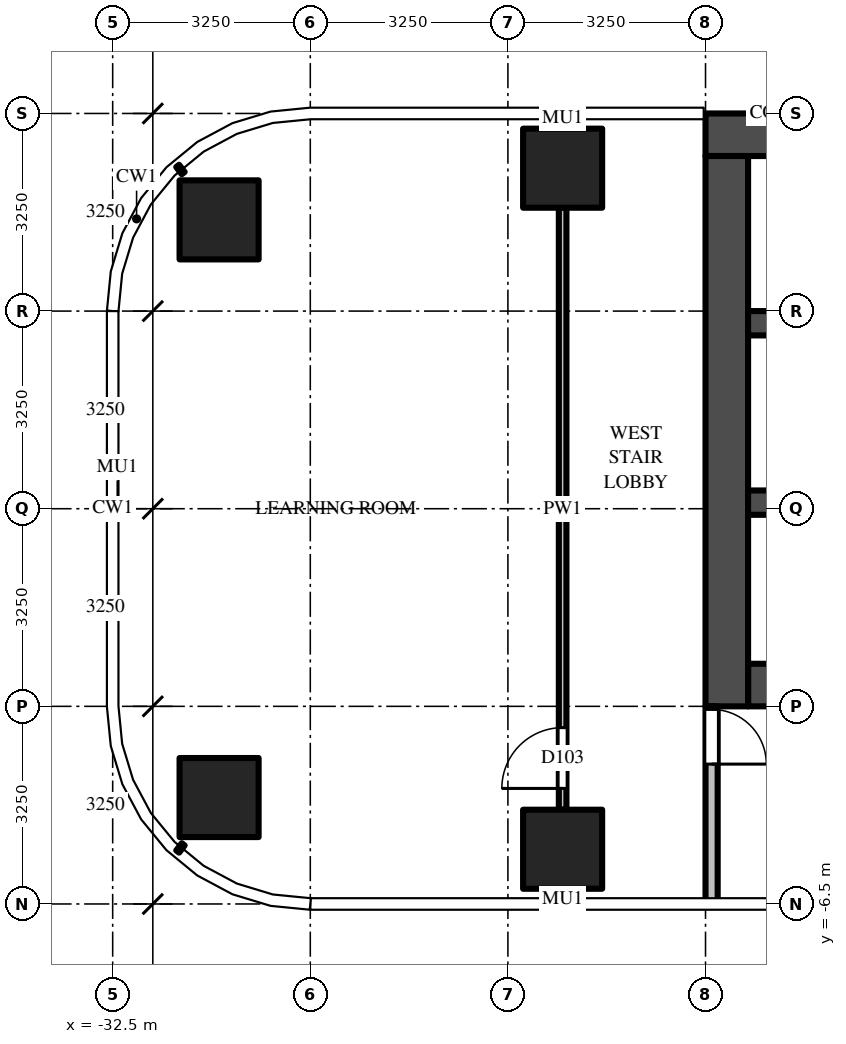
"""IFC4 building model, lengths in metres.
Left out: names, types, materials, properties, quantities, classifications, styles, units other than length and angle.
Written with IfcOpenShell. Run it as: python <this file> out.ifc"""

import sys

from ifc_helpers import new_model, si_unit, direction, frame, frame_2d, origin, origin_2d, place, context, subcontext, project, spatial, polyline, rectangle, outline, extrude, source, transform, mapped, element, fill, save


model = new_model("IFC4")
c1 = context("Model", 3, precision=1e-05, world=origin(), true_north=direction((0.0, 1.0)))
c2 = subcontext(c1, "Body", "Model", "MODEL_VIEW")
j1 = project(units=[si_unit("LENGTHUNIT", "METRE"), si_unit("PLANEANGLEUNIT", "RADIAN")], contexts=[c1])
p1 = place(None, origin())
s1 = spatial("IfcSite", under=j1, at=p1, CompositionType="ELEMENT")
p2 = place(p1, origin())
s2 = spatial("IfcBuilding", under=s1, at=p2, CompositionType="ELEMENT")
p3 = place(p2, frame((0.0, 0.0, 102.0)))
s3 = spatial("IfcBuildingStorey", under=s2, at=p3, CompositionType="ELEMENT", Elevation=102.0)
m1 = source(origin(), c2, "Body", "SweptSolid", [
    extrude(rectangle(XDim=1.3, YDim=1.3, at=origin_2d()), origin(), (0.0, 0.0, 1.0), 4.5),
])
for number, where, z_axis, x_axis in (
    (1, (-25.1, -5.6, 0.0), (0.0, 0.0, 1.0), (1.0, 0.0, 0.0)),
    (2, (-30.75, -4.75, 0.0), (0.0, 0.0, 1.0), (1.0, 0.0, 0.0)),
    (3, (-25.1, 5.6, 0.0), (0.0, 0.0, 1.0), (1.0, 0.0, 0.0)),
    (4, (-30.75, 4.75, 0.0), (0.0, 0.0, 1.0), (1.0, 0.0, 0.0)),
):
    element("IfcColumn", number, at=place(p3, frame(where, z_axis=z_axis, x_axis=x_axis)), inside=s3, PredefinedType="COLUMN", context=c2, shape_type="MappedRepresentation", body=[
        mapped(m1, transform((0.0, 0.0, 0.0))),
    ])
m2 = source(origin(), c2, "Body", "SweptSolid", [
    extrude(rectangle(XDim=16.5, YDim=0.7, at=frame_2d((8.25, 0.0))), origin(), (0.0, 0.0, 1.0), 4.25),
])
p4 = place(p3, frame((-6.25, 6.15, 0.0), z_axis=(0.0, 0.0, 1.0), x_axis=(-1.0, 0.0, 0.0)))
e5 = element("IfcWall", 5, at=p4, inside=s3, PredefinedType="SHEAR", context=c2, shape_type="MappedRepresentation", body=[
    mapped(m2, transform((0.0, 0.0, 0.0))),
])
m3 = source(origin(), c2, "Body", "SweptSolid", [
    extrude(rectangle(XDim=14.85, YDim=0.7, at=frame_2d((7.425, 0.0))), origin(), (0.0, 0.0, 1.0), 4.25),
])
p5 = place(p3, frame((-7.2, -2.9, 0.0), z_axis=(0.0, 0.0, 1.0), x_axis=(-1.0, 0.0, 0.0)))
e6 = element("IfcWall", 6, at=p5, inside=s3, PredefinedType="SHEAR", context=c2, shape_type="MappedRepresentation", body=[
    mapped(m3, transform((0.0, 0.0, 0.0))),
])
m4 = source(origin(), c2, "Body", "SweptSolid", [
    extrude(rectangle(XDim=1.3, YDim=2.1, at=frame_2d((0.65, 1.05))), frame((0.0, 0.36, 0.0), z_axis=(0.0, -1.0, 0.0), x_axis=(1.0, 0.0, 0.0)), (0.0, 0.0, 1.0), 0.72),
])
p6 = place(p5, frame((12.2, 0.0, 0.0)))
e7 = element("IfcOpeningElement", 7, at=p6, cuts=e6, PredefinedType="OPENING", context=c2, shape_type="MappedRepresentation", body=[
    mapped(m4, transform((0.0, 0.0, 0.0))),
])
m5 = source(origin(), c2, "Body", "SweptSolid", [
    extrude(rectangle(XDim=1.2, YDim=2.1, at=frame_2d((0.6, 1.05))), frame((0.0, 0.36, 0.0), z_axis=(0.0, -1.0, 0.0), x_axis=(1.0, 0.0, 0.0)), (0.0, 0.0, 1.0), 0.72),
])
p7 = place(p5, frame((9.85, 0.0, 0.0)))
e8 = element("IfcOpeningElement", 8, at=p7, cuts=e6, PredefinedType="OPENING", context=c2, shape_type="MappedRepresentation", body=[
    mapped(m5, transform((0.0, 0.0, 0.0))),
])
m6 = source(origin(), c2, "Body", "SweptSolid", [
    extrude(rectangle(XDim=1.0, YDim=2.1, at=frame_2d((0.5, 1.05))), frame((0.0, 0.36, 0.0), z_axis=(0.0, -1.0, 0.0), x_axis=(1.0, 0.0, 0.0)), (0.0, 0.0, 1.0), 0.72),
])
p8 = place(p5, frame((7.9, 0.0, 0.0)))
e9 = element("IfcOpeningElement", 9, at=p8, cuts=e6, PredefinedType="OPENING", context=c2, shape_type="MappedRepresentation", body=[
    mapped(m6, transform((0.0, 0.0, 0.0))),
])
m7 = source(origin(), c2, "Body", "SweptSolid", [
    extrude(rectangle(XDim=0.9, YDim=2.1, at=frame_2d((0.45, 1.05))), frame((0.0, 0.36, 0.0), z_axis=(0.0, -1.0, 0.0), x_axis=(1.0, 0.0, 0.0)), (0.0, 0.0, 1.0), 0.72),
])
p9 = place(p5, frame((0.65, 0.0, 0.0)))
e10 = element("IfcOpeningElement", 10, at=p9, cuts=e6, PredefinedType="OPENING", context=c2, shape_type="MappedRepresentation", body=[
    mapped(m7, transform((0.0, 0.0, 0.0))),
])
p10 = place(p5, frame((3.25, 0.0, 0.0)))
e11 = element("IfcOpeningElement", 11, at=p10, cuts=e6, PredefinedType="OPENING", context=c2, shape_type="MappedRepresentation", body=[
    mapped(m7, transform((0.0, 0.0, 0.0))),
])
p11 = place(p5, frame((5.8, 0.0, 0.0)))
e12 = element("IfcOpeningElement", 12, at=p11, cuts=e6, PredefinedType="OPENING", context=c2, shape_type="MappedRepresentation", body=[
    mapped(m6, transform((0.0, 0.0, 0.0))),
])
m8 = source(origin(), c2, "Body", "SweptSolid", [
    extrude(rectangle(XDim=9.05, YDim=0.7, at=frame_2d((4.525, 0.0))), origin(), (0.0, 0.0, 1.0), 4.25),
])
p12 = place(p3, frame((-22.4, 5.8, 0.0), z_axis=(0.0, 0.0, 1.0), x_axis=(0.0, -1.0, 0.0)))
e13 = element("IfcWall", 13, at=p12, inside=s3, PredefinedType="SHEAR", context=c2, shape_type="MappedRepresentation", body=[
    mapped(m8, transform((0.0, 0.0, 0.0))),
])
m9 = source(origin(), c2, "Body", "SweptSolid", [
    extrude(rectangle(XDim=14.85, YDim=0.4, at=frame_2d((7.425, 0.0))), origin(), (0.0, 0.0, 1.0), 4.25),
])
p13 = place(p3, frame((-7.2, 0.1, 0.0), z_axis=(0.0, 0.0, 1.0), x_axis=(-1.0, 0.0, 0.0)))
e14 = element("IfcWall", 14, at=p13, inside=s3, PredefinedType="SHEAR", context=c2, shape_type="MappedRepresentation", body=[
    mapped(m9, transform((0.0, 0.0, 0.0))),
])
m10 = source(origin(), c2, "Body", "SweptSolid", [
    extrude(rectangle(XDim=1.0, YDim=2.1, at=frame_2d((0.5, 1.05))), frame((0.0, 0.21, 0.0), z_axis=(0.0, -1.0, 0.0), x_axis=(1.0, 0.0, 0.0)), (0.0, 0.0, 1.0), 0.42),
])
p14 = place(p13, frame((7.9, 0.0, 0.0)))
e15 = element("IfcOpeningElement", 15, at=p14, cuts=e14, PredefinedType="OPENING", context=c2, shape_type="MappedRepresentation", body=[
    mapped(m10, transform((0.0, 0.0, 0.0))),
])
m11 = source(origin(), c2, "Body", "SweptSolid", [
    extrude(rectangle(XDim=5.7, YDim=0.4, at=frame_2d((2.85, 0.0))), origin(), (0.0, 0.0, 1.0), 4.25),
])
p15 = place(p3, frame((-16.35, 3.05, 0.0), z_axis=(0.0, 0.0, 1.0), x_axis=(-1.0, 0.0, 0.0)))
e16 = element("IfcWall", 16, at=p15, inside=s3, PredefinedType="SHEAR", context=c2, shape_type="MappedRepresentation", body=[
    mapped(m11, transform((0.0, 0.0, 0.0))),
])
m12 = source(origin(), c2, "Body", "SweptSolid", [
    extrude(rectangle(XDim=3.25, YDim=0.2, at=frame_2d((1.625, 0.0))), origin(), (0.0, 0.0, 1.0), 4.25),
])
p16 = place(p3, frame((-22.65, -3.25, 0.0), z_axis=(0.0, 0.0, 1.0), x_axis=(0.0, -1.0, 0.0)))
e17 = element("IfcWall", 17, at=p16, inside=s3, PredefinedType="PARTITIONING", context=c2, shape_type="MappedRepresentation", body=[
    mapped(m12, transform((0.0, 0.0, 0.0))),
])
m13 = source(origin(), c2, "Body", "SweptSolid", [
    extrude(rectangle(XDim=0.9, YDim=2.1, at=frame_2d((0.45, 1.05))), frame((0.0, 0.11, 0.0), z_axis=(0.0, -1.0, 0.0), x_axis=(1.0, 0.0, 0.0)), (0.0, 0.0, 1.0), 0.22),
])
p17 = place(p16, frame((0.05, 0.0, 0.0)))
e18 = element("IfcOpeningElement", 18, at=p17, cuts=e17, PredefinedType="OPENING", context=c2, shape_type="MappedRepresentation", body=[
    mapped(m13, transform((0.0, 0.0, 0.0))),
])
p18 = place(p3, origin())
e19 = element("IfcWall", 19, at=p18, inside=s3, PredefinedType="USERDEFINED", context=c2, shape_type="SweptSolid", body=[
    extrude(outline(polyline([(-33.229, 7.143), (-31.894, 8.213), (-30.24, 8.643), (-30.003, 8.609), (-30.088, 8.015), (-30.206, 8.032), (-31.618, 7.665), (-32.752, 6.756), (-32.964, 6.34), (-33.499, 6.612), (-33.229, 7.143)])), origin(), (0.0, 0.0, 1.0), 0.5),
])
m14 = source(origin(), c2, "Body", "SweptSolid", [
    extrude(rectangle(XDim=9.9, YDim=0.125, at=frame_2d((4.95, 0.0))), origin(), (0.0, 0.0, 1.0), 3.468),
])
p19 = place(p3, frame((-25.1, -4.95, 0.0), z_axis=(0.0, 0.0, 1.0), x_axis=(0.0, 1.0, 0.0)))
e20 = element("IfcWall", 20, at=p19, inside=s3, PredefinedType="PARTITIONING", context=c2, shape_type="MappedRepresentation", body=[
    mapped(m14, transform((0.0, 0.0, 0.0))),
])
m15 = source(origin(), c2, "Body", "SweptSolid", [
    extrude(rectangle(XDim=1.0, YDim=2.1, at=frame_2d((0.5, 1.05))), frame((0.0, 0.073, 0.0), z_axis=(0.0, -1.0, 0.0), x_axis=(1.0, 0.0, 0.0)), (0.0, 0.0, 1.0), 0.145),
])
p20 = place(p19, frame((0.35, 0.0, 0.0)))
e21 = element("IfcOpeningElement", 21, at=p20, cuts=e20, PredefinedType="OPENING", context=c2, shape_type="MappedRepresentation", body=[
    mapped(m15, transform((0.0, 0.0, 0.0))),
])
m16 = source(origin(), c2, "Body", "SweptSolid", [
    extrude(rectangle(XDim=0.9, YDim=2.1, at=frame_2d((0.45, 1.05))), frame((0.0, 0.025, 0.0), z_axis=(0.0, -1.0, 0.0), x_axis=(1.0, 0.0, 0.0)), (0.0, 0.0, 1.0), 0.05),
])
p21 = place(p17, origin())
e22 = element("IfcDoor", 22, at=p21, inside=s3, OperationType="SINGLE_SWING_RIGHT", PredefinedType="DOOR", context=c2, shape_type="MappedRepresentation", body=[
    mapped(m16, transform((0.0, 0.0, 0.0))),
])
fill(e18, e22)
m17 = source(origin(), c2, "Body", "SweptSolid", [
    extrude(rectangle(XDim=1.0, YDim=2.1, at=frame_2d((0.5, 1.05))), frame((0.0, 0.025, 0.0), z_axis=(0.0, -1.0, 0.0), x_axis=(1.0, 0.0, 0.0)), (0.0, 0.0, 1.0), 0.05),
])
p22 = place(p20, origin())
e23 = element("IfcDoor", 23, at=p22, inside=s3, OperationType="SINGLE_SWING_LEFT", PredefinedType="DOOR", context=c2, shape_type="MappedRepresentation", body=[
    mapped(m17, transform((0.0, 0.0, 0.0))),
])
fill(e21, e23)
save(model, sys.argv[1])
